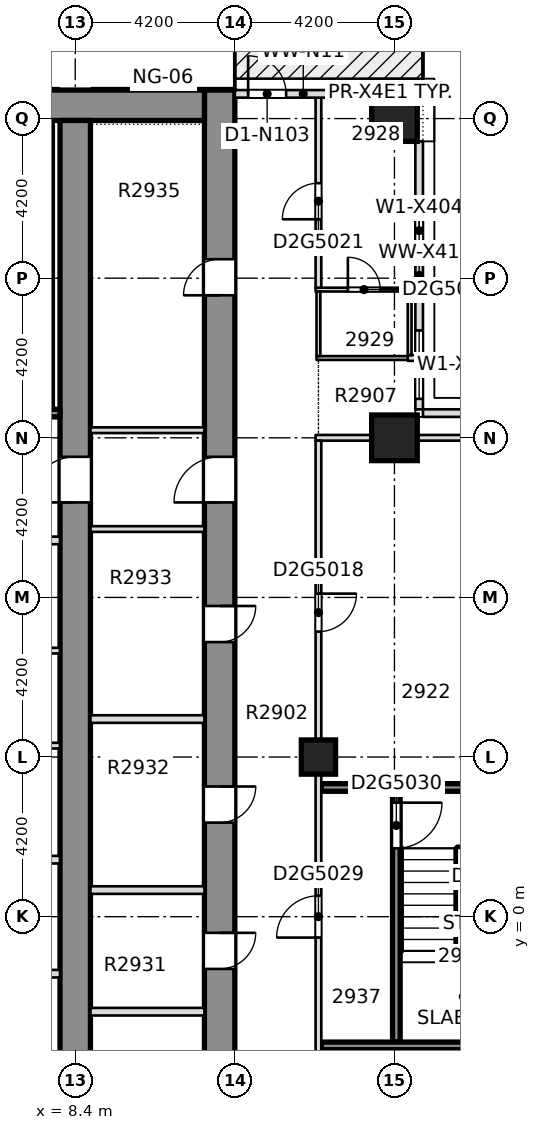
"""IFC4 building model, lengths in metres.
Left out: names, types, materials, properties, quantities, classifications, styles, units other than length and angle.
Written with IfcOpenShell. Run it as: python <this file> out.ifc"""

import sys

from ifc_helpers import new_model, si_unit, direction, frame, frame_2d, origin, origin_2d, place, context, subcontext, project, spatial, rectangle, extrude, element, fill, save


model = new_model("IFC4")
c1 = context("Model", 3, precision=1e-05, world=origin(), true_north=direction((0.0, 1.0)))
c2 = subcontext(c1, "Body", "Model", "MODEL_VIEW")
j1 = project(units=[si_unit("LENGTHUNIT", "METRE"), si_unit("PLANEANGLEUNIT", "RADIAN")], contexts=[c1])
p1 = place(None, origin())
s1 = spatial("IfcSite", under=j1, at=p1, CompositionType="ELEMENT")
p2 = place(p1, origin())
s2 = spatial("IfcBuilding", under=s1, at=p2, CompositionType="ELEMENT")
p3 = place(p2, frame((0.0, 0.0, 114.9)))
s3 = spatial("IfcBuildingStorey", under=s2, at=p3, CompositionType="ELEMENT", Elevation=114.9)
p4 = place(p3, frame((12.2, -8.4, -0.32), z_axis=(0.0, 0.0, 1.0), x_axis=(0.0, 1.0, 0.0)))
e1 = element("IfcWall", 1, at=p4, inside=s3, PredefinedType="SHEAR", context=c2, shape_type="SweptSolid", body=[
    extrude(rectangle(XDim=30.15, YDim=0.8, at=frame_2d((15.075, 0.0))), origin(), (0.0, 0.0, 1.0), 3.45),
])
p5 = place(p4, frame((2.925, 0.0, 0.32)))
e2 = element("IfcOpeningElement", 2, at=p5, cuts=e1, PredefinedType="OPENING", context=c2, shape_type="SweptSolid", body=[
    extrude(rectangle(XDim=0.95, YDim=2.1, at=frame_2d((0.475, 1.05))), frame((0.0, 0.41, 0.0), z_axis=(0.0, -1.0, 0.0), x_axis=(1.0, 0.0, 0.0)), (0.0, 0.0, 1.0), 0.82),
])
p6 = place(p4, frame((7.025, 0.0, 0.32)))
e3 = element("IfcOpeningElement", 3, at=p6, cuts=e1, PredefinedType="OPENING", context=c2, shape_type="SweptSolid", body=[
    extrude(rectangle(XDim=0.95, YDim=2.1, at=frame_2d((0.475, 1.05))), frame((0.0, 0.41, 0.0), z_axis=(0.0, -1.0, 0.0), x_axis=(1.0, 0.0, 0.0)), (0.0, 0.0, 1.0), 0.82),
])
p7 = place(p4, frame((10.875, 0.0, 0.32)))
e4 = element("IfcOpeningElement", 4, at=p7, cuts=e1, PredefinedType="OPENING", context=c2, shape_type="SweptSolid", body=[
    extrude(rectangle(XDim=0.95, YDim=2.1, at=frame_2d((0.475, 1.05))), frame((0.0, 0.41, 0.0), z_axis=(0.0, -1.0, 0.0), x_axis=(1.0, 0.0, 0.0)), (0.0, 0.0, 1.0), 0.82),
])
p8 = place(p4, frame((15.625, 0.0, 0.32)))
e5 = element("IfcOpeningElement", 5, at=p8, cuts=e1, PredefinedType="OPENING", context=c2, shape_type="SweptSolid", body=[
    extrude(rectangle(XDim=0.95, YDim=2.1, at=frame_2d((0.475, 1.05))), frame((0.0, 0.41, 0.0), z_axis=(0.0, -1.0, 0.0), x_axis=(1.0, 0.0, 0.0)), (0.0, 0.0, 1.0), 0.82),
])
p9 = place(p4, frame((24.75, 0.0, 0.32)))
e6 = element("IfcOpeningElement", 6, at=p9, cuts=e1, PredefinedType="OPENING", context=c2, shape_type="SweptSolid", body=[
    extrude(rectangle(XDim=0.95, YDim=2.1, at=frame_2d((0.475, 1.05))), frame((0.0, 0.41, 0.0), z_axis=(0.0, -1.0, 0.0), x_axis=(1.0, 0.0, 0.0)), (0.0, 0.0, 1.0), 0.82),
])
p10 = place(p4, frame((19.3, 0.0, 0.32)))
e7 = element("IfcOpeningElement", 7, at=p10, cuts=e1, PredefinedType="OPENING", context=c2, shape_type="SweptSolid", body=[
    extrude(rectangle(XDim=1.2, YDim=2.1, at=frame_2d((0.6, 1.05))), frame((0.0, 0.41, 0.0), z_axis=(0.0, -1.0, 0.0), x_axis=(1.0, 0.0, 0.0)), (0.0, 0.0, 1.0), 0.82),
])
p11 = place(p3, frame((-11.8, 21.35, -0.32), z_axis=(0.0, 0.0, 1.0), x_axis=(1.0, 0.0, 0.0)))
e8 = element("IfcWall", 8, at=p11, inside=s3, PredefinedType="SHEAR", context=c2, shape_type="SweptSolid", body=[
    extrude(rectangle(XDim=23.6, YDim=0.8, at=frame_2d((11.8, 0.0))), origin(), (0.0, 0.0, 1.0), 3.45),
])
p12 = place(p3, frame((8.4, -7.6, -0.32), z_axis=(0.0, 0.0, 1.0), x_axis=(0.0, 1.0, 0.0)))
e9 = element("IfcWall", 9, at=p12, inside=s3, PredefinedType="SHEAR", context=c2, shape_type="SweptSolid", body=[
    extrude(rectangle(XDim=28.55, YDim=0.8, at=frame_2d((14.275, 0.0))), origin(), (0.0, 0.0, 1.0), 3.45),
])
p13 = place(p12, frame((18.5, 0.0, 0.32)))
e10 = element("IfcOpeningElement", 10, at=p13, cuts=e9, PredefinedType="OPENING", context=c2, shape_type="SweptSolid", body=[
    extrude(rectangle(XDim=1.2, YDim=2.1, at=frame_2d((0.6, 1.05))), frame((0.0, 0.41, 0.0), z_axis=(0.0, -1.0, 0.0), x_axis=(1.0, 0.0, 0.0)), (0.0, 0.0, 1.0), 0.82),
])
for number, where, z_axis, x_axis in (
    (11, (16.8, 12.6, -0.32), (0.0, 0.0, 1.0), (1.0, 0.0, 0.0)),
    (12, (16.8, 21.0, -0.32), (0.0, 0.0, 1.0), (1.0, 0.0, 0.0)),
):
    element("IfcColumn", number, at=place(p3, frame(where, z_axis=z_axis, x_axis=x_axis)), inside=s3, PredefinedType="COLUMN", context=c2, shape_type="SweptSolid", body=[
        extrude(rectangle(XDim=1.2, YDim=1.2, at=origin_2d()), origin(), (0.0, 0.0, 1.0), 3.45),
    ])
p14 = place(p3, frame((14.8, 4.2, -0.32), z_axis=(0.0, 0.0, 1.0), x_axis=(1.0, 0.0, 0.0)))
e13 = element("IfcColumn", 13, at=p14, inside=s3, PredefinedType="COLUMN", context=c2, shape_type="SweptSolid", body=[
    extrude(rectangle(XDim=0.9, YDim=0.9, at=origin_2d()), origin(), (0.0, 0.0, 1.0), 3.45),
])
p15 = place(p3, frame((14.875, 3.4, 0.0), z_axis=(0.0, 0.0, 1.0), x_axis=(1.0, 0.0, 0.0)))
e14 = element("IfcWall", 14, at=p15, inside=s3, PredefinedType="SOLIDWALL", context=c2, shape_type="SweptSolid", body=[
    extrude(rectangle(XDim=5.575, YDim=0.2, at=frame_2d((2.788, 0.0))), origin(), (0.0, 0.0, 1.0), 3.13),
])
p16 = place(p3, frame((14.725, 12.6, 0.0), z_axis=(0.0, 0.0, 1.0), x_axis=(1.0, 0.0, 0.0)))
e15 = element("IfcWall", 15, at=p16, inside=s3, PredefinedType="PARTITIONING", context=c2, shape_type="SweptSolid", body=[
    extrude(rectangle(XDim=2.675, YDim=0.15, at=frame_2d((1.337, 0.0))), origin(), (0.0, 0.0, 1.0), 3.13),
])
p17 = place(p3, frame((14.75, 14.7, 0.0), z_axis=(0.0, 0.0, 1.0), x_axis=(1.0, 0.0, 0.0)))
e16 = element("IfcWall", 16, at=p17, inside=s3, PredefinedType="PARTITIONING", context=c2, shape_type="SweptSolid", body=[
    extrude(rectangle(XDim=2.5, YDim=0.1, at=frame_2d((1.25, 0.0))), origin(), (0.0, 0.0, 1.0), 3.13),
])
p18 = place(p3, frame((17.15, 14.7, 0.0), z_axis=(0.0, 0.0, 1.0), x_axis=(1.0, 0.0, 0.0)))
e17 = element("IfcWall", 17, at=p18, inside=s3, PredefinedType="PARTITIONING", context=c2, shape_type="SweptSolid", body=[
    extrude(rectangle(XDim=0.2, YDim=0.15, at=frame_2d((0.1, 0.0))), origin(), (0.0, 0.0, 1.0), 3.13),
])
p19 = place(p3, frame((14.725, 16.5, 0.0), z_axis=(0.0, 0.0, 1.0), x_axis=(1.0, 0.0, 0.0)))
e18 = element("IfcWall", 18, at=p19, inside=s3, PredefinedType="PARTITIONING", context=c2, shape_type="SweptSolid", body=[
    extrude(rectangle(XDim=2.525, YDim=0.1, at=frame_2d((1.262, 0.0))), origin(), (0.0, 0.0, 1.0), 3.13),
])
p20 = place(p19, frame((0.85, 0.0, 0.0)))
e19 = element("IfcOpeningElement", 19, at=p20, cuts=e18, PredefinedType="OPENING", context=c2, shape_type="SweptSolid", body=[
    extrude(rectangle(XDim=0.85, YDim=2.1, at=frame_2d((0.425, 1.05))), frame((0.0, 0.06, 0.0), z_axis=(0.0, -1.0, 0.0), x_axis=(1.0, 0.0, 0.0)), (0.0, 0.0, 1.0), 0.12),
])
p21 = place(p3, frame((14.8, -6.225, 0.0), z_axis=(0.0, 0.0, 1.0), x_axis=(0.0, 1.0, 0.0)))
e20 = element("IfcWall", 20, at=p21, inside=s3, PredefinedType="PARTITIONING", context=c2, shape_type="SweptSolid", body=[
    extrude(rectangle(XDim=18.75, YDim=0.15, at=frame_2d((9.375, 0.0))), origin(), (0.0, 0.0, 1.0), 3.13),
])
p22 = place(p21, frame((13.725, 0.0, 0.0)))
e21 = element("IfcOpeningElement", 21, at=p22, cuts=e20, PredefinedType="OPENING", context=c2, shape_type="SweptSolid", body=[
    extrude(rectangle(XDim=1.0, YDim=2.1, at=frame_2d((0.5, 1.05))), frame((0.0, 0.085, 0.0), z_axis=(0.0, -1.0, 0.0), x_axis=(1.0, 0.0, 0.0)), (0.0, 0.0, 1.0), 0.17),
])
p23 = place(p21, frame((5.675, 0.0, 0.0)))
e22 = element("IfcOpeningElement", 22, at=p23, cuts=e20, PredefinedType="OPENING", context=c2, shape_type="SweptSolid", body=[
    extrude(rectangle(XDim=1.1, YDim=2.1, at=frame_2d((0.55, 1.05))), frame((0.0, 0.085, 0.0), z_axis=(0.0, -1.0, 0.0), x_axis=(1.0, 0.0, 0.0)), (0.0, 0.0, 1.0), 0.17),
])
p24 = place(p3, frame((14.8, 14.75, 0.0), z_axis=(0.0, 0.0, 1.0), x_axis=(0.0, 1.0, 0.0)))
e23 = element("IfcWall", 23, at=p24, inside=s3, PredefinedType="PARTITIONING", context=c2, shape_type="SweptSolid", body=[
    extrude(rectangle(XDim=1.7, YDim=0.1, at=frame_2d((0.85, 0.0))), origin(), (0.0, 0.0, 1.0), 3.13),
])
p25 = place(p3, frame((14.8, 16.55, 0.0), z_axis=(0.0, 0.0, 1.0), x_axis=(0.0, 1.0, 0.0)))
e24 = element("IfcWall", 24, at=p25, inside=s3, PredefinedType="PARTITIONING", context=c2, shape_type="SweptSolid", body=[
    extrude(rectangle(XDim=5.0, YDim=0.15, at=frame_2d((2.5, 0.0))), origin(), (0.0, 0.0, 1.0), 3.13),
])
p26 = place(p25, frame((1.8, 0.0, 0.0)))
e25 = element("IfcOpeningElement", 25, at=p26, cuts=e24, PredefinedType="OPENING", context=c2, shape_type="SweptSolid", body=[
    extrude(rectangle(XDim=0.95, YDim=2.1, at=frame_2d((0.475, 1.05))), frame((0.0, 0.085, 0.0), z_axis=(0.0, -1.0, 0.0), x_axis=(1.0, 0.0, 0.0)), (0.0, 0.0, 1.0), 0.17),
])
p27 = place(p3, frame((16.85, -3.3, 0.0), z_axis=(0.0, 0.0, 1.0), x_axis=(0.0, 1.0, 0.0)))
e26 = element("IfcWall", 26, at=p27, inside=s3, PredefinedType="SOLIDWALL", context=c2, shape_type="SweptSolid", body=[
    extrude(rectangle(XDim=6.6, YDim=0.2, at=frame_2d((3.3, 0.0))), origin(), (0.0, 0.0, 1.0), 3.13),
])
p28 = place(p27, frame((5.1, 0.0, 0.0)))
e27 = element("IfcOpeningElement", 27, at=p28, cuts=e26, PredefinedType="OPENING", context=c2, shape_type="SweptSolid", body=[
    extrude(rectangle(XDim=1.2, YDim=2.1, at=frame_2d((0.6, 1.05))), frame((0.0, 0.11, 0.0), z_axis=(0.0, -1.0, 0.0), x_axis=(1.0, 0.0, 0.0)), (0.0, 0.0, 1.0), 0.22),
])
p29 = place(p3, frame((17.2, 14.775, 0.0), z_axis=(0.0, 0.0, 1.0), x_axis=(0.0, 1.0, 0.0)))
e28 = element("IfcWall", 28, at=p29, inside=s3, PredefinedType="PARTITIONING", context=c2, shape_type="SweptSolid", body=[
    extrude(rectangle(XDim=1.675, YDim=0.1, at=frame_2d((0.837, 0.0))), origin(), (0.0, 0.0, 1.0), 3.13),
])
p30 = place(p3, frame((24.6, 13.25, 0.0), z_axis=(0.0, 0.0, 1.0), x_axis=(-1.0, 0.0, 0.0)))
e29 = element("IfcWall", 29, at=p30, inside=s3, PredefinedType="STANDARD", context=c2, shape_type="SweptSolid", body=[
    extrude(rectangle(XDim=7.05, YDim=0.2, at=frame_2d((3.525, 0.0))), origin(), (0.0, 0.0, 1.0), 3.13),
])
p31 = place(p3, frame((17.45, 13.35, 0.0), z_axis=(0.0, 0.0, 1.0), x_axis=(0.0, 1.0, 0.0)))
e30 = element("IfcWall", 30, at=p31, inside=s3, PredefinedType="STANDARD", context=c2, shape_type="SweptSolid", body=[
    extrude(rectangle(XDim=7.05, YDim=0.2, at=frame_2d((3.525, 0.0))), origin(), (0.0, 0.0, 1.0), 3.13),
])
p32 = place(p31, frame((0.275, 0.0, 0.2)))
e31 = element("IfcOpeningElement", 31, at=p32, cuts=e30, PredefinedType="OPENING", context=c2, shape_type="SweptSolid", body=[
    extrude(rectangle(XDim=1.8, YDim=2.65, at=frame_2d((0.9, 1.325))), frame((0.0, 0.11, 0.0), z_axis=(0.0, -1.0, 0.0), x_axis=(1.0, 0.0, 0.0)), (0.0, 0.0, 1.0), 0.22),
])
p33 = place(p31, frame((3.8, 0.0, 0.2)))
e32 = element("IfcOpeningElement", 32, at=p33, cuts=e30, PredefinedType="OPENING", context=c2, shape_type="SweptSolid", body=[
    extrude(rectangle(XDim=1.8, YDim=2.65, at=frame_2d((0.9, 1.325))), frame((0.0, 0.11, 0.0), z_axis=(0.0, -1.0, 0.0), x_axis=(1.0, 0.0, 0.0)), (0.0, 0.0, 1.0), 0.22),
])
p34 = place(p3, frame((16.2, 21.65, 0.0), z_axis=(0.0, 0.0, 1.0), x_axis=(-1.0, 0.0, 0.0)))
e33 = element("IfcWall", 33, at=p34, inside=s3, PredefinedType="STANDARD", context=c2, shape_type="SweptSolid", body=[
    extrude(rectangle(XDim=3.6, YDim=0.2, at=frame_2d((1.8, 0.0))), origin(), (0.0, 0.0, 1.0), 3.13),
])
p35 = place(p34, frame((2.25, 0.0, 0.0)))
e34 = element("IfcOpeningElement", 34, at=p35, cuts=e33, PredefinedType="OPENING", context=c2, shape_type="SweptSolid", body=[
    extrude(rectangle(XDim=1.0, YDim=2.4, at=frame_2d((0.5, 1.2))), frame((0.0, 0.11, 0.0), z_axis=(0.0, -1.0, 0.0), x_axis=(1.0, 0.0, 0.0)), (0.0, 0.0, 1.0), 0.22),
])
for number, where, z_axis, x_axis in (
    (35, (5.575, -1.5, 0.0), (0.0, 0.0, 1.0), (1.0, 0.0, 0.0)),
    (36, (5.575, 1.5, 0.0), (0.0, 0.0, 1.0), (1.0, 0.0, 0.0)),
):
    element("IfcWall", number, at=place(p3, frame(where, z_axis=z_axis, x_axis=x_axis)), inside=s3, PredefinedType="PARTITIONING", context=c2, shape_type="SweptSolid", body=[
        extrude(rectangle(XDim=2.424, YDim=0.2, at=frame_2d((1.212, 0.0))), origin(), (0.0, 0.0, 1.0), 3.13),
    ])
p36 = place(p3, frame((5.425, 4.5, 0.0), z_axis=(0.0, 0.0, 1.0), x_axis=(1.0, 0.0, 0.0)))
e37 = element("IfcWall", 37, at=p36, inside=s3, PredefinedType="PARTITIONING", context=c2, shape_type="SweptSolid", body=[
    extrude(rectangle(XDim=2.574, YDim=0.15, at=frame_2d((1.287, 0.0))), origin(), (0.0, 0.0, 1.0), 3.13),
])
p37 = place(p3, frame((-7.999, 7.0, 0.0), z_axis=(0.0, 0.0, 1.0), x_axis=(1.0, 0.0, 0.0)))
e38 = element("IfcWall", 38, at=p37, inside=s3, PredefinedType="PARTITIONING", context=c2, shape_type="SweptSolid", body=[
    extrude(rectangle(XDim=15.998, YDim=0.15, at=frame_2d((7.999, 0.0))), origin(), (0.0, 0.0, 1.0), 3.13),
])
p38 = place(p37, frame((7.299, 0.0, 0.0)))
e39 = element("IfcOpeningElement", 39, at=p38, cuts=e38, PredefinedType="OPENING", context=c2, shape_type="SweptSolid", body=[
    extrude(rectangle(XDim=1.4, YDim=2.1, at=frame_2d((0.7, 1.05))), frame((0.0, 0.085, 0.0), z_axis=(0.0, -1.0, 0.0), x_axis=(1.0, 0.0, 0.0)), (0.0, 0.0, 1.0), 0.17),
])
p39 = place(p3, frame((3.6, 9.9, 0.0), z_axis=(0.0, 0.0, 1.0), x_axis=(1.0, 0.0, 0.0)))
e40 = element("IfcWall", 40, at=p39, inside=s3, PredefinedType="PARTITIONING", context=c2, shape_type="SweptSolid", body=[
    extrude(rectangle(XDim=4.399, YDim=0.2, at=frame_2d((2.199, 0.0))), origin(), (0.0, 0.0, 1.0), 3.13),
])
p40 = place(p39, frame((2.25, 0.0, 0.0)))
e41 = element("IfcOpeningElement", 41, at=p40, cuts=e40, PredefinedType="OPENING", context=c2, shape_type="SweptSolid", body=[
    extrude(rectangle(XDim=1.1, YDim=2.1, at=frame_2d((0.55, 1.05))), frame((0.0, 0.11, 0.0), z_axis=(0.0, -1.0, 0.0), x_axis=(1.0, 0.0, 0.0)), (0.0, 0.0, 1.0), 0.22),
])
p41 = place(p3, frame((3.425, 13.25, 0.0), z_axis=(0.0, 0.0, 1.0), x_axis=(1.0, 0.0, 0.0)))
e42 = element("IfcWall", 42, at=p41, inside=s3, PredefinedType="SOLIDWALL", context=c2, shape_type="SweptSolid", body=[
    extrude(rectangle(XDim=4.574, YDim=0.2, at=frame_2d((2.287, 0.0))), origin(), (0.0, 0.0, 1.0), 3.13),
])
p42 = place(p41, frame((1.825, 0.0, 0.0)))
e43 = element("IfcOpeningElement", 43, at=p42, cuts=e42, PredefinedType="OPENING", context=c2, shape_type="SweptSolid", body=[
    extrude(rectangle(XDim=1.2, YDim=2.1, at=frame_2d((0.6, 1.05))), frame((0.0, 0.11, 0.0), z_axis=(0.0, -1.0, 0.0), x_axis=(1.0, 0.0, 0.0)), (0.0, 0.0, 1.0), 0.22),
])
for number, where, z_axis, x_axis in (
    (44, (8.801, -2.5, 0.0), (0.0, 0.0, 1.0), (1.0, 0.0, 0.0)),
    (45, (8.801, 0.7, 0.0), (0.0, 0.0, 1.0), (1.0, 0.0, 0.0)),
    (46, (8.801, 5.2, 0.0), (0.0, 0.0, 1.0), (1.0, 0.0, 0.0)),
):
    element("IfcWall", number, at=place(p3, frame(where, z_axis=z_axis, x_axis=x_axis)), inside=s3, PredefinedType="PARTITIONING", context=c2, shape_type="SweptSolid", body=[
        extrude(rectangle(XDim=2.998, YDim=0.2, at=frame_2d((1.499, 0.0))), origin(), (0.0, 0.0, 1.0), 3.13),
    ])
for number, where, z_axis, x_axis in (
    (47, (8.801, 10.2, 0.0), (0.0, 0.0, 1.0), (1.0, 0.0, 0.0)),
    (48, (8.801, 12.8, 0.0), (0.0, 0.0, 1.0), (1.0, 0.0, 0.0)),
):
    element("IfcWall", number, at=place(p3, frame(where, z_axis=z_axis, x_axis=x_axis)), inside=s3, PredefinedType="PARTITIONING", context=c2, shape_type="SweptSolid", body=[
        extrude(rectangle(XDim=2.998, YDim=0.15, at=frame_2d((1.499, 0.0))), origin(), (0.0, 0.0, 1.0), 3.13),
    ])
p43 = place(p3, frame((14.875, -3.4, 0.0), z_axis=(0.0, 0.0, 1.0), x_axis=(1.0, 0.0, 0.0)))
e49 = element("IfcWall", 49, at=p43, inside=s3, PredefinedType="SOLIDWALL", context=c2, shape_type="SweptSolid", body=[
    extrude(rectangle(XDim=5.525, YDim=0.2, at=frame_2d((2.762, 0.0))), origin(), (0.0, 0.0, 1.0), 3.13),
])
p44 = place(p3, frame((17.4, 12.6, 0.0), z_axis=(0.0, 0.0, 1.0), x_axis=(1.0, 0.0, 0.0)))
e50 = element("IfcWall", 50, at=p44, inside=s3, PredefinedType="PARTITIONING", context=c2, shape_type="SweptSolid", body=[
    extrude(rectangle(XDim=7.2, YDim=0.15, at=frame_2d((3.6, 0.0))), origin(), (0.0, 0.0, 1.0), 2.58),
])
p45 = place(p22, origin())
e51 = element("IfcDoor", 51, at=p45, inside=s3, OperationType="SINGLE_SWING_RIGHT", PredefinedType="DOOR", context=c2, shape_type="SweptSolid", body=[
    extrude(rectangle(XDim=1.0, YDim=2.1, at=frame_2d((0.5, 1.05))), frame((0.0, 0.025, 0.0), z_axis=(0.0, -1.0, 0.0), x_axis=(1.0, 0.0, 0.0)), (0.0, 0.0, 1.0), 0.05),
])
fill(e21, e51)
p46 = place(p26, origin())
e52 = element("IfcDoor", 52, at=p46, inside=s3, OperationType="SINGLE_SWING_LEFT", PredefinedType="DOOR", context=c2, shape_type="SweptSolid", body=[
    extrude(rectangle(XDim=0.95, YDim=2.1, at=frame_2d((0.475, 1.05))), frame((0.0, 0.025, 0.0), z_axis=(0.0, -1.0, 0.0), x_axis=(1.0, 0.0, 0.0)), (0.0, 0.0, 1.0), 0.05),
])
fill(e25, e52)
p47 = place(p20, origin())
e53 = element("IfcDoor", 53, at=p47, inside=s3, OperationType="SINGLE_SWING_RIGHT", PredefinedType="DOOR", context=c2, shape_type="SweptSolid", body=[
    extrude(rectangle(XDim=0.85, YDim=2.1, at=frame_2d((0.425, 1.05))), frame((0.0, 0.025, 0.0), z_axis=(0.0, -1.0, 0.0), x_axis=(1.0, 0.0, 0.0)), (0.0, 0.0, 1.0), 0.05),
])
fill(e19, e53)
p48 = place(p23, origin())
e54 = element("IfcDoor", 54, at=p48, inside=s3, OperationType="SINGLE_SWING_LEFT", PredefinedType="DOOR", context=c2, shape_type="SweptSolid", body=[
    extrude(rectangle(XDim=1.1, YDim=2.1, at=frame_2d((0.55, 1.05))), frame((0.0, 0.025, 0.0), z_axis=(0.0, -1.0, 0.0), x_axis=(1.0, 0.0, 0.0)), (0.0, 0.0, 1.0), 0.05),
])
fill(e22, e54)
p49 = place(p28, origin())
e55 = element("IfcDoor", 55, at=p49, inside=s3, OperationType="SINGLE_SWING_LEFT", PredefinedType="DOOR", context=c2, shape_type="SweptSolid", body=[
    extrude(rectangle(XDim=1.2, YDim=2.1, at=frame_2d((0.6, 1.05))), frame((0.0, 0.025, 0.0), z_axis=(0.0, -1.0, 0.0), x_axis=(1.0, 0.0, 0.0)), (0.0, 0.0, 1.0), 0.05),
])
fill(e27, e55)
p50 = place(p32, origin())
e56 = element("IfcWindow", 56, at=p50, inside=s3, PartitioningType="SINGLE_PANEL", PredefinedType="WINDOW", context=c2, shape_type="SweptSolid", body=[
    extrude(rectangle(XDim=1.8, YDim=2.65, at=frame_2d((0.9, 1.325))), frame((0.0, 0.03, 0.0), z_axis=(0.0, -1.0, 0.0), x_axis=(1.0, 0.0, 0.0)), (0.0, 0.0, 1.0), 0.06),
])
fill(e31, e56)
p51 = place(p33, origin())
e57 = element("IfcWindow", 57, at=p51, inside=s3, PartitioningType="SINGLE_PANEL", PredefinedType="WINDOW", context=c2, shape_type="SweptSolid", body=[
    extrude(rectangle(XDim=1.8, YDim=2.65, at=frame_2d((0.9, 1.325))), frame((0.0, 0.03, 0.0), z_axis=(0.0, -1.0, 0.0), x_axis=(1.0, 0.0, 0.0)), (0.0, 0.0, 1.0), 0.06),
])
fill(e32, e57)
p52 = place(p35, origin())
e58 = element("IfcDoor", 58, at=p52, inside=s3, OperationType="SINGLE_SWING_LEFT", PredefinedType="DOOR", context=c2, shape_type="SweptSolid", body=[
    extrude(rectangle(XDim=1.0, YDim=2.4, at=frame_2d((0.5, 1.2))), frame((0.0, 0.025, 0.0), z_axis=(0.0, -1.0, 0.0), x_axis=(1.0, 0.0, 0.0)), (0.0, 0.0, 1.0), 0.05),
])
fill(e34, e58)
p53 = place(p6, origin())
e59 = element("IfcDoor", 59, at=p53, inside=s3, OperationType="SINGLE_SWING_LEFT", PredefinedType="DOOR", context=c2, shape_type="SweptSolid", body=[
    extrude(rectangle(XDim=0.95, YDim=2.1, at=frame_2d((0.475, 1.05))), frame((0.0, 0.025, 0.0), z_axis=(0.0, -1.0, 0.0), x_axis=(1.0, 0.0, 0.0)), (0.0, 0.0, 1.0), 0.05),
])
fill(e3, e59)
p54 = place(p7, origin())
e60 = element("IfcDoor", 60, at=p54, inside=s3, OperationType="SINGLE_SWING_LEFT", PredefinedType="DOOR", context=c2, shape_type="SweptSolid", body=[
    extrude(rectangle(XDim=0.95, YDim=2.1, at=frame_2d((0.475, 1.05))), frame((0.0, 0.025, 0.0), z_axis=(0.0, -1.0, 0.0), x_axis=(1.0, 0.0, 0.0)), (0.0, 0.0, 1.0), 0.05),
])
fill(e4, e60)
p55 = place(p8, origin())
e61 = element("IfcDoor", 61, at=p55, inside=s3, OperationType="SINGLE_SWING_LEFT", PredefinedType="DOOR", context=c2, shape_type="SweptSolid", body=[
    extrude(rectangle(XDim=0.95, YDim=2.1, at=frame_2d((0.475, 1.05))), frame((0.0, 0.025, 0.0), z_axis=(0.0, -1.0, 0.0), x_axis=(1.0, 0.0, 0.0)), (0.0, 0.0, 1.0), 0.05),
])
fill(e5, e61)
p56 = place(p9, origin())
e62 = element("IfcDoor", 62, at=p56, inside=s3, OperationType="SINGLE_SWING_LEFT", PredefinedType="DOOR", context=c2, shape_type="SweptSolid", body=[
    extrude(rectangle(XDim=0.95, YDim=2.1, at=frame_2d((0.475, 1.05))), frame((0.0, 0.025, 0.0), z_axis=(0.0, -1.0, 0.0), x_axis=(1.0, 0.0, 0.0)), (0.0, 0.0, 1.0), 0.05),
])
fill(e6, e62)
p57 = place(p10, origin())
e63 = element("IfcDoor", 63, at=p57, inside=s3, OperationType="SINGLE_SWING_LEFT", PredefinedType="DOOR", context=c2, shape_type="SweptSolid", body=[
    extrude(rectangle(XDim=1.2, YDim=2.1, at=frame_2d((0.6, 1.05))), frame((0.0, 0.025, 0.0), z_axis=(0.0, -1.0, 0.0), x_axis=(1.0, 0.0, 0.0)), (0.0, 0.0, 1.0), 0.05),
])
fill(e7, e63)
p58 = place(p13, origin())
e64 = element("IfcDoor", 64, at=p58, inside=s3, OperationType="SINGLE_SWING_LEFT", PredefinedType="DOOR", context=c2, shape_type="SweptSolid", body=[
    extrude(rectangle(XDim=1.2, YDim=2.1, at=frame_2d((0.6, 1.05))), frame((0.0, 0.025, 0.0), z_axis=(0.0, -1.0, 0.0), x_axis=(1.0, 0.0, 0.0)), (0.0, 0.0, 1.0), 0.05),
])
fill(e10, e64)
save(model, sys.argv[1])
